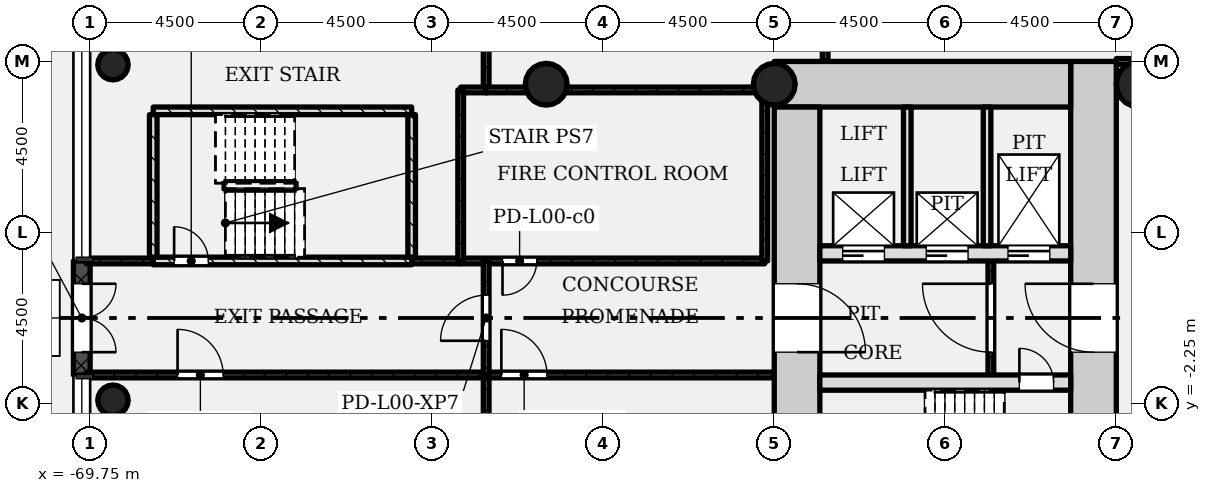
"""IFC4 building model, lengths in metres.
Left out: names, types, materials, properties, quantities, classifications, styles, units other than length and angle.
Written with IfcOpenShell. Run it as: python <this file> out.ifc"""

import sys

from ifc_helpers import new_model, si_unit, direction, frame, frame_2d, origin, origin_2d, place, context, subcontext, project, spatial, rectangle, hollow_circle, extrude, element, fill, save


model = new_model("IFC4")
c1 = context("Model", 3, precision=1e-05, world=origin(), true_north=direction((0.0, 1.0)))
c2 = subcontext(c1, "Body", "Model", "MODEL_VIEW")
j1 = project(units=[si_unit("LENGTHUNIT", "METRE"), si_unit("PLANEANGLEUNIT", "RADIAN")], contexts=[c1])
p1 = place(None, origin())
s1 = spatial("IfcSite", under=j1, at=p1, CompositionType="ELEMENT")
p2 = place(p1, origin())
s2 = spatial("IfcBuilding", under=s1, at=p2, CompositionType="ELEMENT")
p3 = place(p2, origin())
s3 = spatial("IfcBuildingStorey", under=s2, at=p3, CompositionType="ELEMENT", Elevation=0.0)
p4 = place(p3, frame((-43.35, -5.55, -0.4), z_axis=(0.0, 0.0, 1.0), x_axis=(0.0, 1.0, 0.0)))
e1 = element("IfcWall", 1, at=p4, inside=s3, PredefinedType="SHEAR", context=c2, shape_type="SweptSolid", body=[
    extrude(rectangle(XDim=12.3, YDim=1.2, at=frame_2d((6.15, 0.0))), origin(), (0.0, 0.0, 1.0), 6.4),
])
p5 = place(p4, frame((4.65, 0.0, 0.4)))
e2 = element("IfcOpeningElement", 2, at=p5, cuts=e1, PredefinedType="OPENING", context=c2, shape_type="SweptSolid", body=[
    extrude(rectangle(XDim=1.8, YDim=2.1, at=frame_2d((0.9, 1.05))), frame((0.0, 0.61, 0.0), z_axis=(0.0, -1.0, 0.0), x_axis=(1.0, 0.0, 0.0)), (0.0, 0.0, 1.0), 1.22),
])
p6 = place(p3, frame((-43.95, 6.15, -0.4), z_axis=(0.0, 0.0, 1.0), x_axis=(-1.0, 0.0, 0.0)))
e3 = element("IfcWall", 3, at=p6, inside=s3, PredefinedType="SHEAR", context=c2, shape_type="SweptSolid", body=[
    extrude(rectangle(XDim=7.8, YDim=1.2, at=frame_2d((3.9, 0.0))), origin(), (0.0, 0.0, 1.0), 6.4),
])
p7 = place(p3, frame((-51.15, 5.55, -0.4), z_axis=(0.0, 0.0, 1.0), x_axis=(0.0, -1.0, 0.0)))
e4 = element("IfcWall", 4, at=p7, inside=s3, PredefinedType="SHEAR", context=c2, shape_type="SweptSolid", body=[
    extrude(rectangle(XDim=12.3, YDim=1.2, at=frame_2d((6.15, 0.0))), origin(), (0.0, 0.0, 1.0), 6.4),
])
p8 = place(p7, frame((4.65, 0.0, 0.4)))
e5 = element("IfcOpeningElement", 5, at=p8, cuts=e4, PredefinedType="OPENING", context=c2, shape_type="SweptSolid", body=[
    extrude(rectangle(XDim=1.8, YDim=2.1, at=frame_2d((0.9, 1.05))), frame((0.0, 0.61, 0.0), z_axis=(0.0, -1.0, 0.0), x_axis=(1.0, 0.0, 0.0)), (0.0, 0.0, 1.0), 1.22),
])
p9 = place(p3, frame((-50.55, -1.7, -0.4), z_axis=(0.0, 0.0, 1.0), x_axis=(1.0, 0.0, 0.0)))
e6 = element("IfcWall", 6, at=p9, inside=s3, PredefinedType="SHEAR", context=c2, shape_type="SweptSolid", body=[
    extrude(rectangle(XDim=6.6, YDim=0.4, at=frame_2d((3.3, 0.0))), origin(), (0.0, 0.0, 1.0), 6.4),
])
p10 = place(p9, frame((5.25, 0.0, 0.4)))
e7 = element("IfcOpeningElement", 7, at=p10, cuts=e6, PredefinedType="OPENING", context=c2, shape_type="SweptSolid", body=[
    extrude(rectangle(XDim=0.9, YDim=2.1, at=frame_2d((0.45, 1.05))), frame((0.0, 0.21, 0.0), z_axis=(0.0, -1.0, 0.0), x_axis=(1.0, 0.0, 0.0)), (0.0, 0.0, 1.0), 0.42),
])
p11 = place(p3, frame((-50.55, 1.7, -0.4), z_axis=(0.0, 0.0, 1.0), x_axis=(1.0, 0.0, 0.0)))
e8 = element("IfcWall", 8, at=p11, inside=s3, PredefinedType="SHEAR", context=c2, shape_type="SweptSolid", body=[
    extrude(rectangle(XDim=6.6, YDim=0.4, at=frame_2d((3.3, 0.0))), origin(), (0.0, 0.0, 1.0), 6.4),
])
p12 = place(p11, frame((4.95, 0.0, 0.4)))
e9 = element("IfcOpeningElement", 9, at=p12, cuts=e8, PredefinedType="OPENING", context=c2, shape_type="SweptSolid", body=[
    extrude(rectangle(XDim=1.1, YDim=2.1, at=frame_2d((0.55, 1.05))), frame((0.0, 0.21, 0.0), z_axis=(0.0, -1.0, 0.0), x_axis=(1.0, 0.0, 0.0)), (0.0, 0.0, 1.0), 0.42),
])
p13 = place(p11, frame((2.8, 0.0, 0.4)))
e10 = element("IfcOpeningElement", 10, at=p13, cuts=e8, PredefinedType="OPENING", context=c2, shape_type="SweptSolid", body=[
    extrude(rectangle(XDim=1.1, YDim=2.1, at=frame_2d((0.55, 1.05))), frame((0.0, 0.21, 0.0), z_axis=(0.0, -1.0, 0.0), x_axis=(1.0, 0.0, 0.0)), (0.0, 0.0, 1.0), 0.42),
])
p14 = place(p11, frame((0.6, 0.0, 0.4)))
e11 = element("IfcOpeningElement", 11, at=p14, cuts=e8, PredefinedType="OPENING", context=c2, shape_type="SweptSolid", body=[
    extrude(rectangle(XDim=1.1, YDim=2.1, at=frame_2d((0.55, 1.05))), frame((0.0, 0.21, 0.0), z_axis=(0.0, -1.0, 0.0), x_axis=(1.0, 0.0, 0.0)), (0.0, 0.0, 1.0), 0.42),
])
for number, where, z_axis, x_axis in (
    (12, (-51.75, 6.15, -0.4), (0.0, 0.0, 1.0), (1.0, 0.0, 0.0)),
    (13, (-57.75, 6.15, -0.4), (0.0, 0.0, 1.0), (1.0, 0.0, 0.0)),
):
    element("IfcColumn", number, at=place(p3, frame(where, z_axis=z_axis, x_axis=x_axis)), inside=s3, PredefinedType="COLUMN", context=c2, shape_type="SweptSolid", body=[
        extrude(hollow_circle(Radius=0.55, WallThickness=0.04, at=origin_2d()), origin(), (0.0, 0.0, 1.0), 6.4),
    ])
p15 = place(p3, frame((-42.15, 6.15, -0.4), z_axis=(0.0, 0.0, 1.0), x_axis=(1.0, 0.0, 0.0)))
e14 = element("IfcColumn", 14, at=p15, inside=s3, PredefinedType="COLUMN", context=c2, shape_type="SweptSolid", body=[
    extrude(hollow_circle(Radius=0.6, WallThickness=0.045, at=origin_2d()), origin(), (0.0, 0.0, 1.0), 6.4),
])
for number, where, z_axis, x_axis in (
    (15, (-69.15, -2.164, -0.4), (0.0, 0.0, 1.0), (1.0, 0.0, 0.0)),
    (16, (-69.15, 6.664, -0.4), (0.0, 0.0, 1.0), (1.0, 0.0, 0.0)),
):
    element("IfcColumn", number, at=place(p3, frame(where, z_axis=z_axis, x_axis=x_axis)), inside=s3, PredefinedType="COLUMN", context=c2, shape_type="SweptSolid", body=[
        extrude(hollow_circle(Radius=0.4, WallThickness=0.028, at=origin_2d()), origin(), (0.0, 0.0, 1.0), 6.4),
    ])
p16 = place(p3, frame((-69.97, 1.5, 0.0), z_axis=(0.0, 0.0, 1.0), x_axis=(0.0, -1.0, 0.0)))
e17 = element("IfcWall", 17, at=p16, inside=s3, PredefinedType="STANDARD", context=c2, shape_type="SweptSolid", body=[
    extrude(rectangle(XDim=3.0, YDim=0.44, at=frame_2d((1.5, 0.0))), origin(), (0.0, 0.0, 1.0), 5.7),
])
p17 = place(p16, frame((0.6, 0.0, 0.0)))
e18 = element("IfcOpeningElement", 18, at=p17, cuts=e17, PredefinedType="OPENING", context=c2, shape_type="SweptSolid", body=[
    extrude(rectangle(XDim=1.8, YDim=2.1, at=frame_2d((0.9, 1.05))), frame((0.0, 0.23, 0.0), z_axis=(0.0, -1.0, 0.0), x_axis=(1.0, 0.0, 0.0)), (0.0, 0.0, 1.0), 0.46),
])
p18 = place(p3, frame((-46.05, 1.5, 0.0), z_axis=(0.0, 0.0, 1.0), x_axis=(0.0, -1.0, 0.0)))
e19 = element("IfcWall", 19, at=p18, inside=s3, PredefinedType="PARTITIONING", context=c2, shape_type="SweptSolid", body=[
    extrude(rectangle(XDim=3.0, YDim=0.15, at=frame_2d((1.5, 0.0))), origin(), (0.0, 0.0, 1.0), 5.58),
])
p19 = place(p18, frame((0.6, 0.0, 0.0)))
e20 = element("IfcOpeningElement", 20, at=p19, cuts=e19, PredefinedType="OPENING", context=c2, shape_type="SweptSolid", body=[
    extrude(rectangle(XDim=1.8, YDim=2.1, at=frame_2d((0.9, 1.05))), frame((0.0, 0.085, 0.0), z_axis=(0.0, -1.0, 0.0), x_axis=(1.0, 0.0, 0.0)), (0.0, 0.0, 1.0), 0.17),
])
for number, where, z_axis, x_axis in (
    (21, (-46.15, 5.55, 0.0), (0.0, 0.0, 1.0), (0.0, -1.0, 0.0)),
    (22, (-48.25, 5.55, 0.0), (0.0, 0.0, 1.0), (0.0, -1.0, 0.0)),
):
    element("IfcWall", number, at=place(p3, frame(where, z_axis=z_axis, x_axis=x_axis)), inside=s3, PredefinedType="SOLIDWALL", context=c2, shape_type="SweptSolid", body=[
        extrude(rectangle(XDim=3.65, YDim=0.2, at=frame_2d((1.825, 0.0))), origin(), (0.0, 0.0, 1.0), 5.58),
    ])
p20 = place(p3, frame((-60.0, 1.5, 0.0), z_axis=(0.0, 0.0, 1.0), x_axis=(-1.0, 0.0, 0.0)))
e23 = element("IfcWall", 23, at=p20, inside=s3, PredefinedType="PARTITIONING", context=c2, shape_type="SweptSolid", body=[
    extrude(rectangle(XDim=1.29, YDim=0.15, at=frame_2d((0.645, 0.0))), origin(), (0.0, 0.0, 1.0), 5.58),
])
p21 = place(p3, frame((-68.09, 1.5, 0.0), z_axis=(0.0, 0.0, 1.0), x_axis=(-1.0, 0.0, 0.0)))
e24 = element("IfcWall", 24, at=p21, inside=s3, PredefinedType="PARTITIONING", context=c2, shape_type="SweptSolid", body=[
    extrude(rectangle(XDim=1.76, YDim=0.15, at=frame_2d((0.88, 0.0))), origin(), (0.0, 0.0, 1.0), 5.58),
])
p22 = place(p3, frame((-59.33, 26.5, 0.0), z_axis=(0.0, 0.0, 1.0), x_axis=(0.0, -1.0, 0.0)))
e25 = element("IfcWall", 25, at=p22, inside=s3, PredefinedType="PARTITIONING", context=c2, shape_type="SweptSolid", body=[
    extrude(rectangle(XDim=20.5, YDim=0.15, at=frame_2d((10.25, 0.0))), origin(), (0.0, 0.0, 1.0), 5.58),
])
p23 = place(p3, frame((-69.85, -1.5, 0.0), z_axis=(0.0, 0.0, 1.0), x_axis=(1.0, 0.0, 0.0)))
e26 = element("IfcWall", 26, at=p23, inside=s3, PredefinedType="PARTITIONING", context=c2, shape_type="SweptSolid", body=[
    extrude(rectangle(XDim=10.52, YDim=0.15, at=frame_2d((5.26, 0.0))), origin(), (0.0, 0.0, 1.0), 5.58),
])
p24 = place(p23, frame((2.4, 0.0, 0.0)))
e27 = element("IfcOpeningElement", 27, at=p24, cuts=e26, PredefinedType="OPENING", context=c2, shape_type="SweptSolid", body=[
    extrude(rectangle(XDim=1.2, YDim=2.1, at=frame_2d((0.6, 1.05))), frame((0.0, 0.085, 0.0), z_axis=(0.0, -1.0, 0.0), x_axis=(1.0, 0.0, 0.0)), (0.0, 0.0, 1.0), 0.17),
])
p25 = place(p3, frame((-59.33, -1.5, 0.0), z_axis=(0.0, 0.0, 1.0), x_axis=(0.0, -1.0, 0.0)))
e28 = element("IfcWall", 28, at=p25, inside=s3, PredefinedType="PARTITIONING", context=c2, shape_type="SweptSolid", body=[
    extrude(rectangle(XDim=22.0, YDim=0.15, at=frame_2d((11.0, 0.0))), origin(), (0.0, 0.0, 1.0), 5.58),
])
p26 = place(p3, frame((-59.33, -1.5, 0.0), z_axis=(0.0, 0.0, 1.0), x_axis=(1.0, 0.0, 0.0)))
e29 = element("IfcWall", 29, at=p26, inside=s3, PredefinedType="PARTITIONING", context=c2, shape_type="SweptSolid", body=[
    extrude(rectangle(XDim=7.58, YDim=0.15, at=frame_2d((3.79, 0.0))), origin(), (0.0, 0.0, 1.0), 5.58),
])
p27 = place(p26, frame((0.4, 0.0, 0.0)))
e30 = element("IfcOpeningElement", 30, at=p27, cuts=e29, PredefinedType="OPENING", context=c2, shape_type="SweptSolid", body=[
    extrude(rectangle(XDim=1.2, YDim=2.1, at=frame_2d((0.6, 1.05))), frame((0.0, 0.085, 0.0), z_axis=(0.0, -1.0, 0.0), x_axis=(1.0, 0.0, 0.0)), (0.0, 0.0, 1.0), 0.17),
])
p28 = place(p3, frame((-41.49, 6.75, 0.0), z_axis=(0.0, 0.0, 1.0), x_axis=(-1.0, 0.0, 0.0)))
e31 = element("IfcWall", 31, at=p28, inside=s3, PredefinedType="PARTITIONING", context=c2, shape_type="SweptSolid", body=[
    extrude(rectangle(XDim=1.26, YDim=0.15, at=frame_2d((0.63, 0.0))), origin(), (0.0, 0.0, 1.0), 5.58),
])
p29 = place(p3, frame((-50.41, 6.75, 0.0), z_axis=(0.0, 0.0, 1.0), x_axis=(0.0, 1.0, 0.0)))
e32 = element("IfcWall", 32, at=p29, inside=s3, PredefinedType="PARTITIONING", context=c2, shape_type="SweptSolid", body=[
    extrude(rectangle(XDim=19.75, YDim=0.15, at=frame_2d((9.875, 0.0))), origin(), (0.0, 0.0, 1.0), 5.58),
])
p30 = place(p3, frame((-60.0, 1.5, 0.0), z_axis=(0.0, 0.0, 1.0), x_axis=(1.0, 0.0, 0.0)))
e33 = element("IfcWall", 33, at=p30, inside=s3, PredefinedType="PARTITIONING", context=c2, shape_type="SweptSolid", body=[
    extrude(rectangle(XDim=8.0, YDim=0.15, at=frame_2d((4.0, 0.0))), origin(), (0.0, 0.0, 1.0), 5.58),
])
p31 = place(p30, frame((1.1, 0.0, 0.0)))
e34 = element("IfcOpeningElement", 34, at=p31, cuts=e33, PredefinedType="OPENING", context=c2, shape_type="SweptSolid", body=[
    extrude(rectangle(XDim=0.9, YDim=2.1, at=frame_2d((0.45, 1.05))), frame((0.0, 0.085, 0.0), z_axis=(0.0, -1.0, 0.0), x_axis=(1.0, 0.0, 0.0)), (0.0, 0.0, 1.0), 0.17),
])
p32 = place(p3, frame((-59.31, 6.0, 0.0), z_axis=(0.0, 0.0, 1.0), x_axis=(-1.0, 0.0, 0.0)))
e35 = element("IfcWall", 35, at=p32, inside=s3, PredefinedType="PARTITIONING", context=c2, shape_type="SweptSolid", body=[
    extrude(rectangle(XDim=0.69, YDim=0.15, at=frame_2d((0.345, 0.0))), origin(), (0.0, 0.0, 1.0), 5.58),
])
for number, where, z_axis, x_axis in (
    (36, (-60.0, 6.0, 0.0), (0.0, 0.0, 1.0), (0.0, -1.0, 0.0)),
    (37, (-52.0, 1.5, 0.0), (0.0, 0.0, 1.0), (0.0, 1.0, 0.0)),
):
    element("IfcWall", number, at=place(p3, frame(where, z_axis=z_axis, x_axis=x_axis)), inside=s3, PredefinedType="PARTITIONING", context=c2, shape_type="SweptSolid", body=[
        extrude(rectangle(XDim=4.5, YDim=0.15, at=frame_2d((2.25, 0.0))), origin(), (0.0, 0.0, 1.0), 5.58),
    ])
p33 = place(p3, frame((-52.0, 6.0, 0.0), z_axis=(0.0, 0.0, 1.0), x_axis=(-1.0, 0.0, 0.0)))
e38 = element("IfcWall", 38, at=p33, inside=s3, PredefinedType="PARTITIONING", context=c2, shape_type="SweptSolid", body=[
    extrude(rectangle(XDim=7.35, YDim=0.15, at=frame_2d((3.675, 0.0))), origin(), (0.0, 0.0, 1.0), 5.58),
])
p34 = place(p3, frame((-59.33, -1.5, 0.0), z_axis=(0.0, 0.0, 1.0), x_axis=(0.0, 1.0, 0.0)))
e39 = element("IfcWall", 39, at=p34, inside=s3, PredefinedType="PARTITIONING", context=c2, shape_type="SweptSolid", body=[
    extrude(rectangle(XDim=3.0, YDim=0.15, at=frame_2d((1.5, 0.0))), origin(), (0.0, 0.0, 1.0), 5.58),
])
p35 = place(p34, frame((0.9, 0.0, 0.0)))
e40 = element("IfcOpeningElement", 40, at=p35, cuts=e39, PredefinedType="OPENING", context=c2, shape_type="SweptSolid", body=[
    extrude(rectangle(XDim=1.2, YDim=2.1, at=frame_2d((0.6, 1.05))), frame((0.0, 0.085, 0.0), z_axis=(0.0, -1.0, 0.0), x_axis=(1.0, 0.0, 0.0)), (0.0, 0.0, 1.0), 0.17),
])
p36 = place(p3, frame((-68.09, 1.5, 0.0), z_axis=(0.0, 0.0, 1.0), x_axis=(1.0, 0.0, 0.0)))
e41 = element("IfcWall", 41, at=p36, inside=s3, PredefinedType="SHEAR", context=c2, shape_type="SweptSolid", body=[
    extrude(rectangle(XDim=6.8, YDim=0.2, at=frame_2d((3.4, 0.0))), origin(), (0.0, 0.0, 1.0), 5.58),
])
p37 = place(p36, frame((0.55, 0.0, 0.0)))
e42 = element("IfcOpeningElement", 42, at=p37, cuts=e41, PredefinedType="OPENING", context=c2, shape_type="SweptSolid", body=[
    extrude(rectangle(XDim=0.9, YDim=2.1, at=frame_2d((0.45, 1.05))), frame((0.0, 0.11, 0.0), z_axis=(0.0, -1.0, 0.0), x_axis=(1.0, 0.0, 0.0)), (0.0, 0.0, 1.0), 0.22),
])
p38 = place(p3, frame((-68.09, 5.45, 0.0), z_axis=(0.0, 0.0, 1.0), x_axis=(1.0, 0.0, 0.0)))
e43 = element("IfcWall", 43, at=p38, inside=s3, PredefinedType="SHEAR", context=c2, shape_type="SweptSolid", body=[
    extrude(rectangle(XDim=6.8, YDim=0.2, at=frame_2d((3.4, 0.0))), origin(), (0.0, 0.0, 1.0), 5.58),
])
for number, where, z_axis, x_axis in (
    (44, (-68.09, 1.6, 0.0), (0.0, 0.0, 1.0), (0.0, 1.0, 0.0)),
    (45, (-61.29, 1.6, 0.0), (0.0, 0.0, 1.0), (0.0, 1.0, 0.0)),
):
    element("IfcWall", number, at=place(p3, frame(where, z_axis=z_axis, x_axis=x_axis)), inside=s3, PredefinedType="SHEAR", context=c2, shape_type="SweptSolid", body=[
        extrude(rectangle(XDim=3.75, YDim=0.2, at=frame_2d((1.875, 0.0))), origin(), (0.0, 0.0, 1.0), 5.58),
    ])
p39 = place(p17, origin())
e46 = element("IfcDoor", 46, at=p39, inside=s3, OperationType="DOUBLE_DOOR_DOUBLE_SWING", PredefinedType="DOOR", context=c2, shape_type="SweptSolid", body=[
    extrude(rectangle(XDim=1.8, YDim=2.1, at=frame_2d((0.9, 1.05))), frame((0.0, 0.025, 0.0), z_axis=(0.0, -1.0, 0.0), x_axis=(1.0, 0.0, 0.0)), (0.0, 0.0, 1.0), 0.05),
])
fill(e18, e46)
p40 = place(p19, origin())
e47 = element("IfcDoor", 47, at=p40, inside=s3, OperationType="SINGLE_SWING_LEFT", PredefinedType="DOOR", context=c2, shape_type="SweptSolid", body=[
    extrude(rectangle(XDim=1.8, YDim=2.1, at=frame_2d((0.9, 1.05))), frame((0.0, 0.025, 0.0), z_axis=(0.0, -1.0, 0.0), x_axis=(1.0, 0.0, 0.0)), (0.0, 0.0, 1.0), 0.05),
])
fill(e20, e47)
p41 = place(p24, origin())
e48 = element("IfcDoor", 48, at=p41, inside=s3, OperationType="SINGLE_SWING_RIGHT", PredefinedType="DOOR", context=c2, shape_type="SweptSolid", body=[
    extrude(rectangle(XDim=1.2, YDim=2.1, at=frame_2d((0.6, 1.05))), frame((0.0, 0.025, 0.0), z_axis=(0.0, -1.0, 0.0), x_axis=(1.0, 0.0, 0.0)), (0.0, 0.0, 1.0), 0.05),
])
fill(e27, e48)
p42 = place(p27, origin())
e49 = element("IfcDoor", 49, at=p42, inside=s3, OperationType="SINGLE_SWING_RIGHT", PredefinedType="DOOR", context=c2, shape_type="SweptSolid", body=[
    extrude(rectangle(XDim=1.2, YDim=2.1, at=frame_2d((0.6, 1.05))), frame((0.0, 0.025, 0.0), z_axis=(0.0, -1.0, 0.0), x_axis=(1.0, 0.0, 0.0)), (0.0, 0.0, 1.0), 0.05),
])
fill(e30, e49)
p43 = place(p31, origin())
e50 = element("IfcDoor", 50, at=p43, inside=s3, OperationType="SINGLE_SWING_LEFT", PredefinedType="DOOR", context=c2, shape_type="SweptSolid", body=[
    extrude(rectangle(XDim=0.9, YDim=2.1, at=frame_2d((0.45, 1.05))), frame((0.0, 0.025, 0.0), z_axis=(0.0, -1.0, 0.0), x_axis=(1.0, 0.0, 0.0)), (0.0, 0.0, 1.0), 0.05),
])
fill(e34, e50)
p44 = place(p35, origin())
e51 = element("IfcDoor", 51, at=p44, inside=s3, OperationType="SINGLE_SWING_RIGHT", PredefinedType="DOOR", context=c2, shape_type="SweptSolid", body=[
    extrude(rectangle(XDim=1.2, YDim=2.1, at=frame_2d((0.6, 1.05))), frame((0.0, 0.025, 0.0), z_axis=(0.0, -1.0, 0.0), x_axis=(1.0, 0.0, 0.0)), (0.0, 0.0, 1.0), 0.05),
])
fill(e40, e51)
p45 = place(p37, origin())
e52 = element("IfcDoor", 52, at=p45, inside=s3, OperationType="SINGLE_SWING_RIGHT", PredefinedType="DOOR", context=c2, shape_type="SweptSolid", body=[
    extrude(rectangle(XDim=0.9, YDim=2.1, at=frame_2d((0.45, 1.05))), frame((0.0, 0.025, 0.0), z_axis=(0.0, -1.0, 0.0), x_axis=(1.0, 0.0, 0.0)), (0.0, 0.0, 1.0), 0.05),
])
fill(e42, e52)
p46 = place(p10, origin())
e53 = element("IfcDoor", 53, at=p46, inside=s3, OperationType="SINGLE_SWING_RIGHT", PredefinedType="DOOR", context=c2, shape_type="SweptSolid", body=[
    extrude(rectangle(XDim=0.9, YDim=2.1, at=frame_2d((0.45, 1.05))), frame((0.0, 0.025, 0.0), z_axis=(0.0, -1.0, 0.0), x_axis=(1.0, 0.0, 0.0)), (0.0, 0.0, 1.0), 0.05),
])
fill(e7, e53)
p47 = place(p12, origin())
e54 = element("IfcDoor", 54, at=p47, inside=s3, OperationType="SLIDING_TO_LEFT", PredefinedType="DOOR", context=c2, shape_type="SweptSolid", body=[
    extrude(rectangle(XDim=1.1, YDim=2.1, at=frame_2d((0.55, 1.05))), frame((0.0, 0.025, 0.0), z_axis=(0.0, -1.0, 0.0), x_axis=(1.0, 0.0, 0.0)), (0.0, 0.0, 1.0), 0.05),
])
fill(e9, e54)
p48 = place(p13, origin())
e55 = element("IfcDoor", 55, at=p48, inside=s3, OperationType="SLIDING_TO_LEFT", PredefinedType="DOOR", context=c2, shape_type="SweptSolid", body=[
    extrude(rectangle(XDim=1.1, YDim=2.1, at=frame_2d((0.55, 1.05))), frame((0.0, 0.025, 0.0), z_axis=(0.0, -1.0, 0.0), x_axis=(1.0, 0.0, 0.0)), (0.0, 0.0, 1.0), 0.05),
])
fill(e10, e55)
p49 = place(p14, origin())
e56 = element("IfcDoor", 56, at=p49, inside=s3, OperationType="SLIDING_TO_LEFT", PredefinedType="DOOR", context=c2, shape_type="SweptSolid", body=[
    extrude(rectangle(XDim=1.1, YDim=2.1, at=frame_2d((0.55, 1.05))), frame((0.0, 0.025, 0.0), z_axis=(0.0, -1.0, 0.0), x_axis=(1.0, 0.0, 0.0)), (0.0, 0.0, 1.0), 0.05),
])
fill(e11, e56)
p50 = place(p5, origin())
e57 = element("IfcDoor", 57, at=p50, inside=s3, OperationType="SINGLE_SWING_LEFT", PredefinedType="DOOR", context=c2, shape_type="SweptSolid", body=[
    extrude(rectangle(XDim=1.8, YDim=2.1, at=frame_2d((0.9, 1.05))), frame((0.0, 0.025, 0.0), z_axis=(0.0, -1.0, 0.0), x_axis=(1.0, 0.0, 0.0)), (0.0, 0.0, 1.0), 0.05),
])
fill(e2, e57)
p51 = place(p8, origin())
e58 = element("IfcDoor", 58, at=p51, inside=s3, OperationType="SINGLE_SWING_LEFT", PredefinedType="DOOR", context=c2, shape_type="SweptSolid", body=[
    extrude(rectangle(XDim=1.8, YDim=2.1, at=frame_2d((0.9, 1.05))), frame((0.0, 0.025, 0.0), z_axis=(0.0, -1.0, 0.0), x_axis=(1.0, 0.0, 0.0)), (0.0, 0.0, 1.0), 0.05),
])
fill(e5, e58)
save(model, sys.argv[1])
